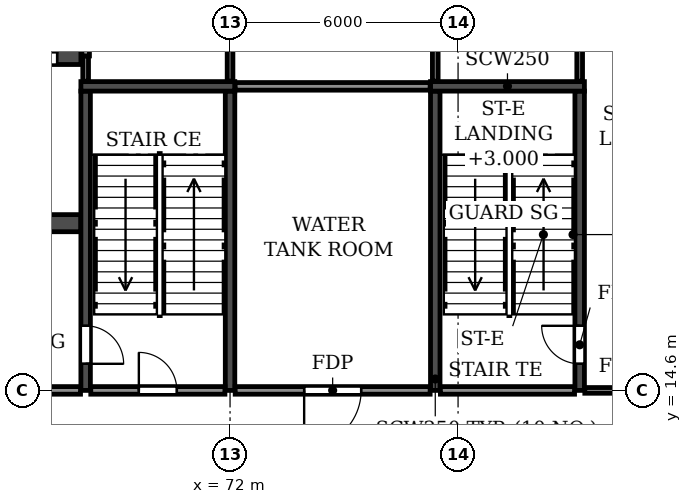
"""IFC4 building model, lengths in metres.
Left out: names, types, materials, properties, quantities, classifications, styles, units other than length and angle.
Written with IfcOpenShell. Run it as: python <this file> out.ifc"""

import sys

from ifc_helpers import new_model, si_unit, direction, frame, frame_2d, origin, place, context, subcontext, project, spatial, rectangle, extrude, element, fill, save


model = new_model("IFC4")
c1 = context("Model", 3, precision=1e-05, world=origin(), true_north=direction((0.0, 1.0)))
c2 = subcontext(c1, "Body", "Model", "MODEL_VIEW")
j1 = project(units=[si_unit("LENGTHUNIT", "METRE"), si_unit("PLANEANGLEUNIT", "RADIAN")], contexts=[c1])
p1 = place(None, origin())
s1 = spatial("IfcSite", under=j1, at=p1, CompositionType="ELEMENT")
p2 = place(p1, origin())
s2 = spatial("IfcBuilding", under=s1, at=p2, CompositionType="ELEMENT")
p3 = place(p2, origin())
s3 = spatial("IfcBuildingStorey", under=s2, at=p3, CompositionType="ELEMENT", Elevation=0.0)
p4 = place(p3, frame((33.925, 19.0, 0.0), z_axis=(0.0, 0.0, 1.0), x_axis=(1.0, 0.0, 0.0)))
e1 = element("IfcWall", 1, at=p4, inside=s3, PredefinedType="SOLIDWALL", context=c2, shape_type="SweptSolid", body=[
    extrude(rectangle(XDim=34.15, YDim=0.45, at=frame_2d((17.075, 0.0))), origin(), (0.0, 0.0, 1.0), 4.2),
])
p5 = place(p4, frame((16.175, 0.0, 0.0)))
e2 = element("IfcOpeningElement", 2, at=p5, cuts=e1, PredefinedType="OPENING", context=c2, shape_type="SweptSolid", body=[
    extrude(rectangle(XDim=1.8, YDim=2.1, at=frame_2d((0.9, 1.05))), frame((0.0, 0.235, 0.0), z_axis=(0.0, -1.0, 0.0), x_axis=(1.0, 0.0, 0.0)), (0.0, 0.0, 1.0), 0.47),
])
p6 = place(p4, frame((1.525, 0.0, 0.0)))
e3 = element("IfcOpeningElement", 3, at=p6, cuts=e1, PredefinedType="OPENING", context=c2, shape_type="SweptSolid", body=[
    extrude(rectangle(XDim=1.8, YDim=2.1, at=frame_2d((0.9, 1.05))), frame((0.0, 0.235, 0.0), z_axis=(0.0, -1.0, 0.0), x_axis=(1.0, 0.0, 0.0)), (0.0, 0.0, 1.0), 0.47),
])
p7 = place(p4, frame((8.725, 0.0, 0.0)))
e4 = element("IfcOpeningElement", 4, at=p7, cuts=e1, PredefinedType="OPENING", context=c2, shape_type="SweptSolid", body=[
    extrude(rectangle(XDim=1.1, YDim=2.1, at=frame_2d((0.55, 1.05))), frame((0.0, 0.235, 0.0), z_axis=(0.0, -1.0, 0.0), x_axis=(1.0, 0.0, 0.0)), (0.0, 0.0, 1.0), 0.47),
])
p8 = place(p4, frame((11.325, 0.0, 0.0)))
e5 = element("IfcOpeningElement", 5, at=p8, cuts=e1, PredefinedType="OPENING", context=c2, shape_type="SweptSolid", body=[
    extrude(rectangle(XDim=1.1, YDim=2.1, at=frame_2d((0.55, 1.05))), frame((0.0, 0.235, 0.0), z_axis=(0.0, -1.0, 0.0), x_axis=(1.0, 0.0, 0.0)), (0.0, 0.0, 1.0), 0.47),
])
p9 = place(p4, frame((13.925, 0.0, 0.0)))
e6 = element("IfcOpeningElement", 6, at=p9, cuts=e1, PredefinedType="OPENING", context=c2, shape_type="SweptSolid", body=[
    extrude(rectangle(XDim=1.1, YDim=2.1, at=frame_2d((0.55, 1.05))), frame((0.0, 0.235, 0.0), z_axis=(0.0, -1.0, 0.0), x_axis=(1.0, 0.0, 0.0)), (0.0, 0.0, 1.0), 0.47),
])
p10 = place(p4, frame((19.125, 0.0, 0.0)))
e7 = element("IfcOpeningElement", 7, at=p10, cuts=e1, PredefinedType="OPENING", context=c2, shape_type="SweptSolid", body=[
    extrude(rectangle(XDim=1.1, YDim=2.1, at=frame_2d((0.55, 1.05))), frame((0.0, 0.235, 0.0), z_axis=(0.0, -1.0, 0.0), x_axis=(1.0, 0.0, 0.0)), (0.0, 0.0, 1.0), 0.47),
])
p11 = place(p4, frame((21.725, 0.0, 0.0)))
e8 = element("IfcOpeningElement", 8, at=p11, cuts=e1, PredefinedType="OPENING", context=c2, shape_type="SweptSolid", body=[
    extrude(rectangle(XDim=1.1, YDim=2.1, at=frame_2d((0.55, 1.05))), frame((0.0, 0.235, 0.0), z_axis=(0.0, -1.0, 0.0), x_axis=(1.0, 0.0, 0.0)), (0.0, 0.0, 1.0), 0.47),
])
p12 = place(p4, frame((24.325, 0.0, 0.0)))
e9 = element("IfcOpeningElement", 9, at=p12, cuts=e1, PredefinedType="OPENING", context=c2, shape_type="SweptSolid", body=[
    extrude(rectangle(XDim=1.1, YDim=2.1, at=frame_2d((0.55, 1.05))), frame((0.0, 0.235, 0.0), z_axis=(0.0, -1.0, 0.0), x_axis=(1.0, 0.0, 0.0)), (0.0, 0.0, 1.0), 0.47),
])
p13 = place(p4, frame((30.825, 0.0, 0.0)))
e10 = element("IfcOpeningElement", 10, at=p13, cuts=e1, PredefinedType="OPENING", context=c2, shape_type="SweptSolid", body=[
    extrude(rectangle(XDim=1.8, YDim=2.1, at=frame_2d((0.9, 1.05))), frame((0.0, 0.235, 0.0), z_axis=(0.0, -1.0, 0.0), x_axis=(1.0, 0.0, 0.0)), (0.0, 0.0, 1.0), 0.47),
])
p14 = place(p3, frame((33.925, 23.4, 0.0), z_axis=(0.0, 0.0, 1.0), x_axis=(1.0, 0.0, 0.0)))
e11 = element("IfcWall", 11, at=p14, inside=s3, PredefinedType="SOLIDWALL", context=c2, shape_type="SweptSolid", body=[
    extrude(rectangle(XDim=34.15, YDim=0.45, at=frame_2d((17.075, 0.0))), origin(), (0.0, 0.0, 1.0), 4.2),
])
p15 = place(p14, frame((16.175, 0.0, 0.0)))
e12 = element("IfcOpeningElement", 12, at=p15, cuts=e11, PredefinedType="OPENING", context=c2, shape_type="SweptSolid", body=[
    extrude(rectangle(XDim=1.8, YDim=2.1, at=frame_2d((0.9, 1.05))), frame((0.0, 0.235, 0.0), z_axis=(0.0, -1.0, 0.0), x_axis=(1.0, 0.0, 0.0)), (0.0, 0.0, 1.0), 0.47),
])
p16 = place(p14, frame((11.025, 0.0, 0.0)))
e13 = element("IfcOpeningElement", 13, at=p16, cuts=e11, PredefinedType="OPENING", context=c2, shape_type="SweptSolid", body=[
    extrude(rectangle(XDim=1.1, YDim=2.1, at=frame_2d((0.55, 1.05))), frame((0.0, 0.235, 0.0), z_axis=(0.0, -1.0, 0.0), x_axis=(1.0, 0.0, 0.0)), (0.0, 0.0, 1.0), 0.47),
])
p17 = place(p14, frame((19.425, 0.0, 0.0)))
e14 = element("IfcOpeningElement", 14, at=p17, cuts=e11, PredefinedType="OPENING", context=c2, shape_type="SweptSolid", body=[
    extrude(rectangle(XDim=1.1, YDim=2.1, at=frame_2d((0.55, 1.05))), frame((0.0, 0.235, 0.0), z_axis=(0.0, -1.0, 0.0), x_axis=(1.0, 0.0, 0.0)), (0.0, 0.0, 1.0), 0.47),
])
p18 = place(p14, frame((22.025, 0.0, 0.0)))
e15 = element("IfcOpeningElement", 15, at=p18, cuts=e11, PredefinedType="OPENING", context=c2, shape_type="SweptSolid", body=[
    extrude(rectangle(XDim=1.1, YDim=2.1, at=frame_2d((0.55, 1.05))), frame((0.0, 0.235, 0.0), z_axis=(0.0, -1.0, 0.0), x_axis=(1.0, 0.0, 0.0)), (0.0, 0.0, 1.0), 0.47),
])
p19 = place(p14, frame((24.625, 0.0, 0.0)))
e16 = element("IfcOpeningElement", 16, at=p19, cuts=e11, PredefinedType="OPENING", context=c2, shape_type="SweptSolid", body=[
    extrude(rectangle(XDim=1.1, YDim=2.1, at=frame_2d((0.55, 1.05))), frame((0.0, 0.235, 0.0), z_axis=(0.0, -1.0, 0.0), x_axis=(1.0, 0.0, 0.0)), (0.0, 0.0, 1.0), 0.47),
])
p20 = place(p14, frame((29.825, 0.0, 0.0)))
e17 = element("IfcOpeningElement", 17, at=p20, cuts=e11, PredefinedType="OPENING", context=c2, shape_type="SweptSolid", body=[
    extrude(rectangle(XDim=1.1, YDim=2.1, at=frame_2d((0.55, 1.05))), frame((0.0, 0.235, 0.0), z_axis=(0.0, -1.0, 0.0), x_axis=(1.0, 0.0, 0.0)), (0.0, 0.0, 1.0), 0.47),
])
p21 = place(p14, frame((32.425, 0.0, 0.0)))
e18 = element("IfcOpeningElement", 18, at=p21, cuts=e11, PredefinedType="OPENING", context=c2, shape_type="SweptSolid", body=[
    extrude(rectangle(XDim=1.1, YDim=2.1, at=frame_2d((0.55, 1.05))), frame((0.0, 0.235, 0.0), z_axis=(0.0, -1.0, 0.0), x_axis=(1.0, 0.0, 0.0)), (0.0, 0.0, 1.0), 0.47),
])
p22 = place(p3, frame((68.2, 14.6, 0.0), z_axis=(0.0, 0.0, 1.0), x_axis=(0.0, 1.0, 0.0)))
e19 = element("IfcWall", 19, at=p22, inside=s3, PredefinedType="SOLIDWALL", context=c2, shape_type="SweptSolid", body=[
    extrude(rectangle(XDim=7.875, YDim=0.25, at=frame_2d((3.938, 0.0))), origin(), (0.0, 0.0, 1.0), 4.2),
])
p23 = place(p22, frame((0.7, 0.0, 0.0)))
e20 = element("IfcOpeningElement", 20, at=p23, cuts=e19, PredefinedType="OPENING", context=c2, shape_type="SweptSolid", body=[
    extrude(rectangle(XDim=1.0, YDim=2.1, at=frame_2d((0.5, 1.05))), frame((0.0, 0.135, 0.0), z_axis=(0.0, -1.0, 0.0), x_axis=(1.0, 0.0, 0.0)), (0.0, 0.0, 1.0), 0.27),
])
p24 = place(p3, frame((72.0, 14.6, 0.0), z_axis=(0.0, 0.0, 1.0), x_axis=(0.0, 1.0, 0.0)))
e21 = element("IfcWall", 21, at=p24, inside=s3, PredefinedType="SOLIDWALL", context=c2, shape_type="SweptSolid", body=[
    extrude(rectangle(XDim=7.875, YDim=0.25, at=frame_2d((3.938, 0.0))), origin(), (0.0, 0.0, 1.0), 4.2),
])
p25 = place(p3, frame((68.075, 22.6, 0.0), z_axis=(0.0, 0.0, 1.0), x_axis=(1.0, 0.0, 0.0)))
e22 = element("IfcWall", 22, at=p25, inside=s3, PredefinedType="SOLIDWALL", context=c2, shape_type="SweptSolid", body=[
    extrude(rectangle(XDim=4.05, YDim=0.25, at=frame_2d((2.025, 0.0))), origin(), (0.0, 0.0, 1.0), 4.2),
])
p26 = place(p3, frame((77.4, 14.6, 0.0), z_axis=(0.0, 0.0, 1.0), x_axis=(0.0, 1.0, 0.0)))
e23 = element("IfcWall", 23, at=p26, inside=s3, PredefinedType="SOLIDWALL", context=c2, shape_type="SweptSolid", body=[
    extrude(rectangle(XDim=7.875, YDim=0.25, at=frame_2d((3.938, 0.0))), origin(), (0.0, 0.0, 1.0), 4.2),
])
p27 = place(p3, frame((81.2, 14.6, 0.0), z_axis=(0.0, 0.0, 1.0), x_axis=(0.0, 1.0, 0.0)))
e24 = element("IfcWall", 24, at=p27, inside=s3, PredefinedType="SOLIDWALL", context=c2, shape_type="SweptSolid", body=[
    extrude(rectangle(XDim=7.875, YDim=0.25, at=frame_2d((3.938, 0.0))), origin(), (0.0, 0.0, 1.0), 4.2),
])
p28 = place(p27, frame((0.7, 0.0, 0.0)))
e25 = element("IfcOpeningElement", 25, at=p28, cuts=e24, PredefinedType="OPENING", context=c2, shape_type="SweptSolid", body=[
    extrude(rectangle(XDim=1.0, YDim=2.1, at=frame_2d((0.5, 1.05))), frame((0.0, 0.135, 0.0), z_axis=(0.0, -1.0, 0.0), x_axis=(1.0, 0.0, 0.0)), (0.0, 0.0, 1.0), 0.27),
])
p29 = place(p3, frame((77.275, 22.6, 0.0), z_axis=(0.0, 0.0, 1.0), x_axis=(1.0, 0.0, 0.0)))
e26 = element("IfcWall", 26, at=p29, inside=s3, PredefinedType="SOLIDWALL", context=c2, shape_type="SweptSolid", body=[
    extrude(rectangle(XDim=4.05, YDim=0.25, at=frame_2d((2.025, 0.0))), origin(), (0.0, 0.0, 1.0), 4.2),
])
p30 = place(p3, frame((81.335, 14.6, 0.0), z_axis=(0.0, 0.0, 1.0), x_axis=(1.0, 0.0, 0.0)))
e27 = element("IfcWall", 27, at=p30, inside=s3, PredefinedType="PARTITIONING", context=c2, shape_type="SweptSolid", body=[
    extrude(rectangle(XDim=20.665, YDim=0.15, at=frame_2d((10.333, 0.0))), origin(), (0.0, 0.0, 1.0), 4.2),
])
p31 = place(p30, frame((0.765, 0.0, 0.0)))
e28 = element("IfcOpeningElement", 28, at=p31, cuts=e27, PredefinedType="OPENING", context=c2, shape_type="SweptSolid", body=[
    extrude(rectangle(XDim=1.0, YDim=2.1, at=frame_2d((0.5, 1.05))), frame((0.0, 0.085, 0.0), z_axis=(0.0, -1.0, 0.0), x_axis=(1.0, 0.0, 0.0)), (0.0, 0.0, 1.0), 0.17),
])
p32 = place(p3, frame((72.135, 14.6, 0.0), z_axis=(0.0, 0.0, 1.0), x_axis=(1.0, 0.0, 0.0)))
e29 = element("IfcWall", 29, at=p32, inside=s3, PredefinedType="PARTITIONING", context=c2, shape_type="SweptSolid", body=[
    extrude(rectangle(XDim=5.13, YDim=0.2, at=frame_2d((2.565, 0.0))), origin(), (0.0, 0.0, 1.0), 4.2),
])
p33 = place(p32, frame((1.815, 0.0, 0.0)))
e30 = element("IfcOpeningElement", 30, at=p33, cuts=e29, PredefinedType="OPENING", context=c2, shape_type="SweptSolid", body=[
    extrude(rectangle(XDim=1.5, YDim=2.1, at=frame_2d((0.75, 1.05))), frame((0.0, 0.11, 0.0), z_axis=(0.0, -1.0, 0.0), x_axis=(1.0, 0.0, 0.0)), (0.0, 0.0, 1.0), 0.22),
])
p34 = place(p3, frame((72.135, 22.6, 0.0), z_axis=(0.0, 0.0, 1.0), x_axis=(1.0, 0.0, 0.0)))
e31 = element("IfcWall", 31, at=p34, inside=s3, PredefinedType="PARTITIONING", context=c2, shape_type="SweptSolid", body=[
    extrude(rectangle(XDim=5.13, YDim=0.2, at=frame_2d((2.565, 0.0))), origin(), (0.0, 0.0, 1.0), 4.2),
])
p35 = place(p3, frame((68.2, 22.735, 0.0), z_axis=(0.0, 0.0, 1.0), x_axis=(0.0, 1.0, 0.0)))
e32 = element("IfcWall", 32, at=p35, inside=s3, PredefinedType="PARTITIONING", context=c2, shape_type="SweptSolid", body=[
    extrude(rectangle(XDim=0.665, YDim=0.15, at=frame_2d((0.333, 0.0))), origin(), (0.0, 0.0, 1.0), 4.2),
])
for number, where, z_axis, x_axis in (
    (33, (72.0, 22.735, 0.0), (0.0, 0.0, 1.0), (0.0, 1.0, 0.0)),
    (34, (77.4, 22.735, 0.0), (0.0, 0.0, 1.0), (0.0, 1.0, 0.0)),
):
    element("IfcWall", number, at=place(p3, frame(where, z_axis=z_axis, x_axis=x_axis)), inside=s3, PredefinedType="PARTITIONING", context=c2, shape_type="SweptSolid", body=[
        extrude(rectangle(XDim=4.965, YDim=0.15, at=frame_2d((2.482, 0.0))), origin(), (0.0, 0.0, 1.0), 4.2),
    ])
p36 = place(p3, frame((81.2, 22.735, 0.0), z_axis=(0.0, 0.0, 1.0), x_axis=(0.0, 1.0, 0.0)))
e35 = element("IfcWall", 35, at=p36, inside=s3, PredefinedType="PARTITIONING", context=c2, shape_type="SweptSolid", body=[
    extrude(rectangle(XDim=4.99, YDim=0.15, at=frame_2d((2.495, 0.0))), origin(), (0.0, 0.0, 1.0), 4.2),
])
p37 = place(p3, frame((60.0, 14.6, 0.0), z_axis=(0.0, 0.0, 1.0), x_axis=(1.0, 0.0, 0.0)))
e36 = element("IfcWall", 36, at=p37, inside=s3, PredefinedType="PARTITIONING", context=c2, shape_type="SweptSolid", body=[
    extrude(rectangle(XDim=8.065, YDim=0.2, at=frame_2d((4.032, 0.0))), origin(), (0.0, 0.0, 1.0), 4.2),
])
p38 = place(p3, frame((68.2, 23.4, 0.0), z_axis=(0.0, 0.0, 1.0), x_axis=(0.0, 1.0, 0.0)))
e37 = element("IfcWall", 37, at=p38, inside=s3, PredefinedType="PARTITIONING", context=c2, shape_type="SweptSolid", body=[
    extrude(rectangle(XDim=2.7, YDim=0.2, at=frame_2d((1.35, 0.0))), origin(), (0.0, 0.0, 1.0), 4.2),
])
p39 = place(p3, frame((68.335, 14.6, 0.0), z_axis=(0.0, 0.0, 1.0), x_axis=(1.0, 0.0, 0.0)))
e38 = element("IfcWall", 38, at=p39, inside=s3, PredefinedType="PARTITIONING", context=c2, shape_type="SweptSolid", body=[
    extrude(rectangle(XDim=3.53, YDim=0.2, at=frame_2d((1.765, 0.0))), origin(), (0.0, 0.0, 1.0), 4.2),
])
p40 = place(p39, frame((1.265, 0.0, 0.0)))
e39 = element("IfcOpeningElement", 39, at=p40, cuts=e38, PredefinedType="OPENING", context=c2, shape_type="SweptSolid", body=[
    extrude(rectangle(XDim=1.0, YDim=2.1, at=frame_2d((0.5, 1.05))), frame((0.0, 0.11, 0.0), z_axis=(0.0, -1.0, 0.0), x_axis=(1.0, 0.0, 0.0)), (0.0, 0.0, 1.0), 0.22),
])
p41 = place(p3, frame((77.535, 14.6, 0.0), z_axis=(0.0, 0.0, 1.0), x_axis=(1.0, 0.0, 0.0)))
e40 = element("IfcWall", 40, at=p41, inside=s3, PredefinedType="PARTITIONING", context=c2, shape_type="SweptSolid", body=[
    extrude(rectangle(XDim=3.53, YDim=0.2, at=frame_2d((1.765, 0.0))), origin(), (0.0, 0.0, 1.0), 4.2),
])
p42 = place(p40, origin())
e41 = element("IfcDoor", 41, at=p42, inside=s3, OperationType="SINGLE_SWING_LEFT", PredefinedType="DOOR", context=c2, shape_type="SweptSolid", body=[
    extrude(rectangle(XDim=1.0, YDim=2.1, at=frame_2d((0.5, 1.05))), frame((0.0, 0.025, 0.0), z_axis=(0.0, -1.0, 0.0), x_axis=(1.0, 0.0, 0.0)), (0.0, 0.0, 1.0), 0.05),
])
fill(e39, e41)
p43 = place(p33, frame((1.5, 0.0, 0.0), z_axis=(0.0, 0.0, 1.0), x_axis=(-1.0, 0.0, 0.0)))
e42 = element("IfcDoor", 42, at=p43, inside=s3, OperationType="DOUBLE_DOOR_SINGLE_SWING", PredefinedType="DOOR", context=c2, shape_type="SweptSolid", body=[
    extrude(rectangle(XDim=1.5, YDim=2.1, at=frame_2d((0.75, 1.05))), frame((0.0, 0.025, 0.0), z_axis=(0.0, -1.0, 0.0), x_axis=(1.0, 0.0, 0.0)), (0.0, 0.0, 1.0), 0.05),
])
fill(e30, e42)
p44 = place(p23, frame((1.0, 0.0, 0.0), z_axis=(0.0, 0.0, 1.0), x_axis=(-1.0, 0.0, 0.0)))
e43 = element("IfcDoor", 43, at=p44, inside=s3, OperationType="SINGLE_SWING_RIGHT", PredefinedType="DOOR", context=c2, shape_type="SweptSolid", body=[
    extrude(rectangle(XDim=1.0, YDim=2.1, at=frame_2d((0.5, 1.05))), frame((0.0, 0.025, 0.0), z_axis=(0.0, -1.0, 0.0), x_axis=(1.0, 0.0, 0.0)), (0.0, 0.0, 1.0), 0.05),
])
fill(e20, e43)
p45 = place(p21, origin())
e44 = element("IfcDoor", 44, at=p45, inside=s3, OperationType="DOUBLE_DOOR_SLIDING", PredefinedType="DOOR", context=c2, shape_type="SweptSolid", body=[
    extrude(rectangle(XDim=1.1, YDim=2.1, at=frame_2d((0.55, 1.05))), frame((0.0, 0.025, 0.0), z_axis=(0.0, -1.0, 0.0), x_axis=(1.0, 0.0, 0.0)), (0.0, 0.0, 1.0), 0.05),
])
fill(e18, e44)
p46 = place(p28, origin())
e45 = element("IfcDoor", 45, at=p46, inside=s3, OperationType="SINGLE_SWING_RIGHT", PredefinedType="DOOR", context=c2, shape_type="SweptSolid", body=[
    extrude(rectangle(XDim=1.0, YDim=2.1, at=frame_2d((0.5, 1.05))), frame((0.0, 0.025, 0.0), z_axis=(0.0, -1.0, 0.0), x_axis=(1.0, 0.0, 0.0)), (0.0, 0.0, 1.0), 0.05),
])
fill(e25, e45)
save(model, sys.argv[1])
